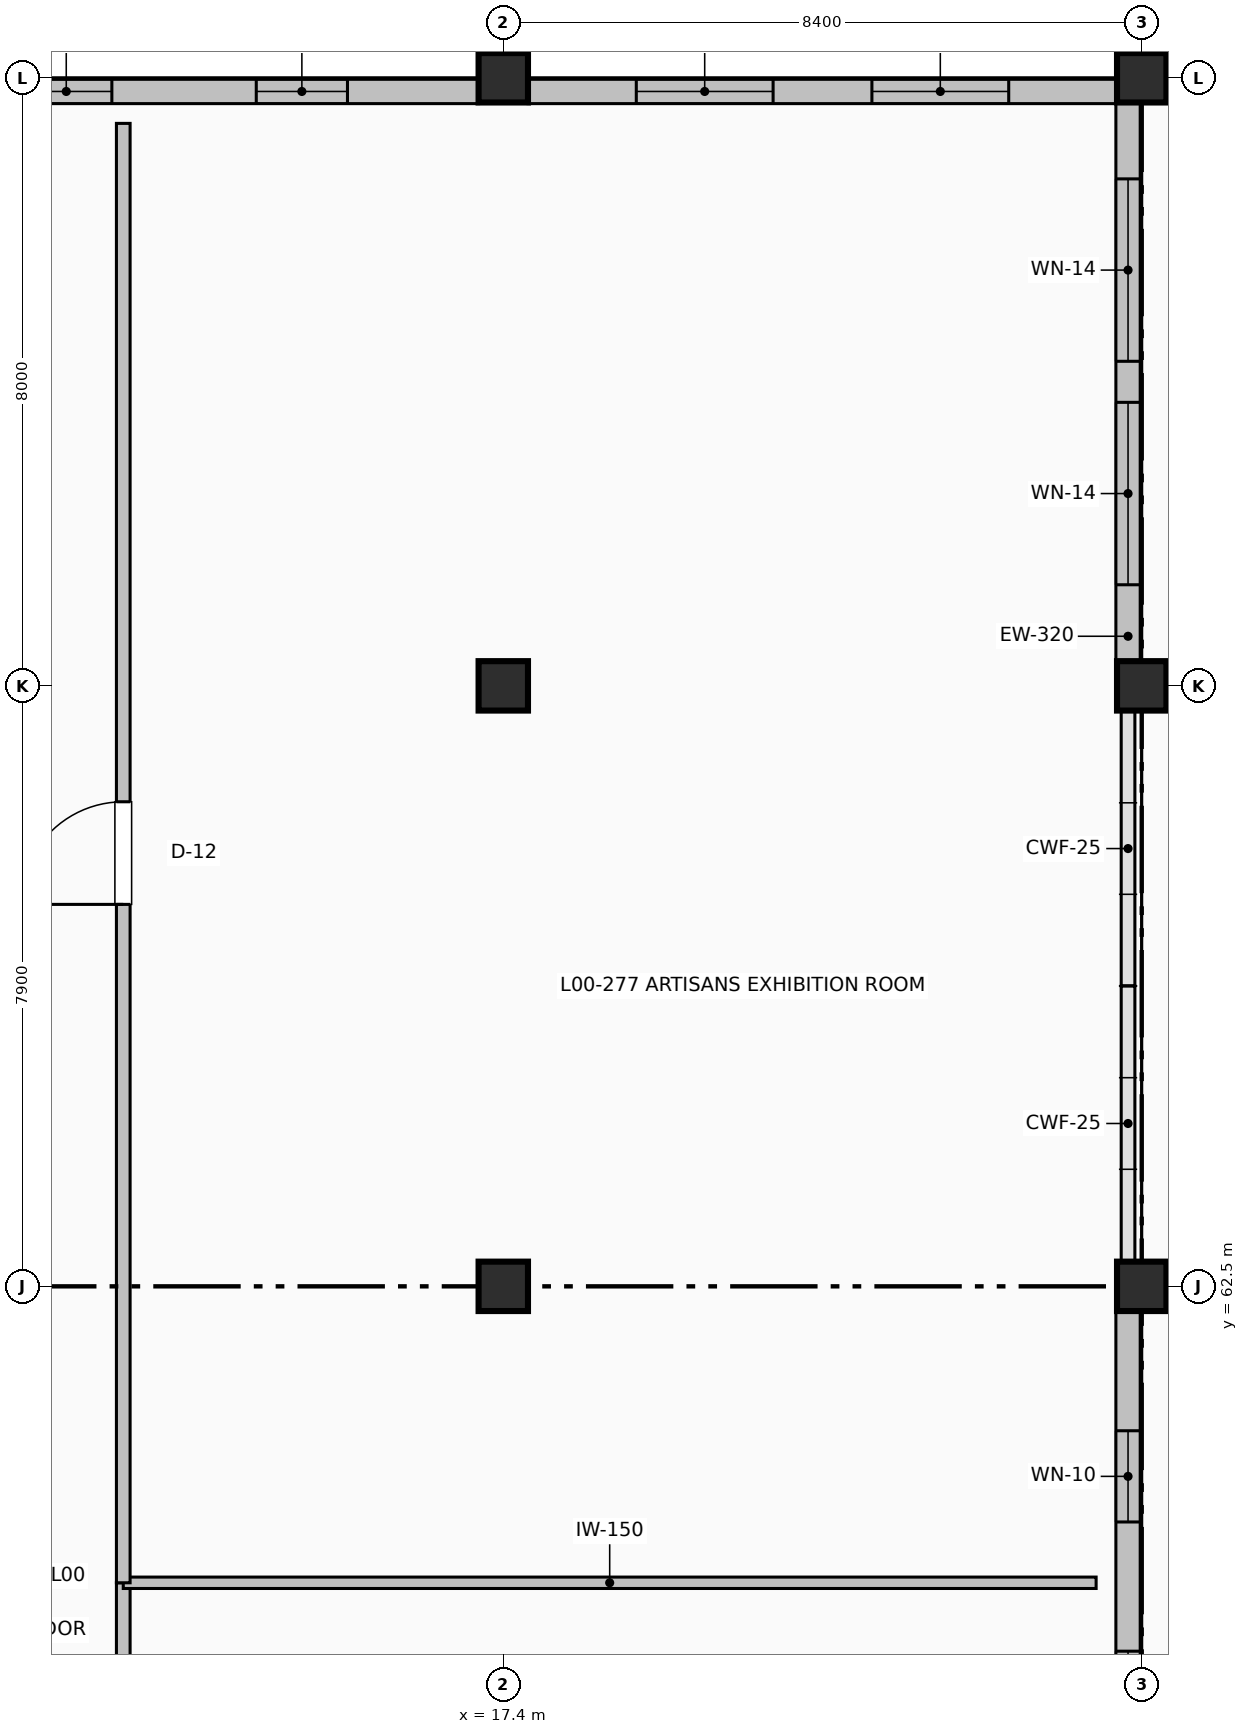
"""IFC4 building model, lengths in metres.
Left out: names, types, materials, properties, quantities, classifications, styles, units other than length and angle.
Written with IfcOpenShell. Run it as: python <this file> out.ifc"""

import sys

from ifc_helpers import new_model, si_unit, direction, frame, frame_2d, origin, origin_2d, place, context, subcontext, project, spatial, rectangle, extrude, element, fill, save


model = new_model("IFC4")
c1 = context("Model", 3, precision=1e-05, world=origin(), true_north=direction((0.0, 1.0)))
c2 = subcontext(c1, "Body", "Model", "MODEL_VIEW")
j1 = project(units=[si_unit("LENGTHUNIT", "METRE"), si_unit("PLANEANGLEUNIT", "RADIAN")], contexts=[c1])
p1 = place(None, origin())
s1 = spatial("IfcSite", under=j1, at=p1, CompositionType="ELEMENT")
p2 = place(p1, origin())
s2 = spatial("IfcBuilding", under=s1, at=p2, CompositionType="ELEMENT")
p3 = place(p2, origin())
s3 = spatial("IfcBuildingStorey", under=s2, at=p3, CompositionType="ELEMENT", Elevation=0.0)
for number, where, z_axis, x_axis in (
    (1, (17.4, 62.5, 0.0), (0.0, 0.0, 1.0), (1.0, 0.0, 0.0)),
    (2, (17.4, 70.4, 0.0), (0.0, 0.0, 1.0), (1.0, 0.0, 0.0)),
    (3, (17.4, 78.4, 0.0), (0.0, 0.0, 1.0), (1.0, 0.0, 0.0)),
    (4, (25.8, 62.5, 0.0), (0.0, 0.0, 1.0), (1.0, 0.0, 0.0)),
    (5, (25.8, 70.4, 0.0), (0.0, 0.0, 1.0), (1.0, 0.0, 0.0)),
    (6, (25.8, 78.4, 0.0), (0.0, 0.0, 1.0), (1.0, 0.0, 0.0)),
):
    element("IfcColumn", number, at=place(p3, frame(where, z_axis=z_axis, x_axis=x_axis)), inside=s3, PredefinedType="COLUMN", context=c2, shape_type="SweptSolid", body=[
        extrude(rectangle(XDim=0.65, YDim=0.65, at=origin_2d()), origin(), (0.0, 0.0, 1.0), 5.4),
    ])
p4 = place(p3, frame((9.325, 78.22, 0.0), z_axis=(0.0, 0.0, 1.0), x_axis=(1.0, 0.0, 0.0)))
e7 = element("IfcWall", 7, at=p4, inside=s3, PredefinedType="SOLIDWALL", context=c2, shape_type="SweptSolid", body=[
    extrude(rectangle(XDim=7.75, YDim=0.32, at=frame_2d((3.875, 0.0))), origin(), (0.0, 0.0, 1.0), 4.242),
])
p5 = place(p4, frame((1.725, 0.0, 0.95)))
e8 = element("IfcOpeningElement", 8, at=p5, cuts=e7, PredefinedType="OPENING", context=c2, shape_type="SweptSolid", body=[
    extrude(rectangle(XDim=1.2, YDim=1.9, at=frame_2d((0.6, 0.95))), frame((0.0, 0.17, 0.0), z_axis=(0.0, -1.0, 0.0), x_axis=(1.0, 0.0, 0.0)), (0.0, 0.0, 1.0), 0.34),
])
p6 = place(p4, frame((4.825, 0.0, 0.95)))
e9 = element("IfcOpeningElement", 9, at=p6, cuts=e7, PredefinedType="OPENING", context=c2, shape_type="SweptSolid", body=[
    extrude(rectangle(XDim=1.2, YDim=1.9, at=frame_2d((0.6, 0.95))), frame((0.0, 0.17, 0.0), z_axis=(0.0, -1.0, 0.0), x_axis=(1.0, 0.0, 0.0)), (0.0, 0.0, 1.0), 0.34),
])
p7 = place(p3, frame((17.725, 78.22, 0.0), z_axis=(0.0, 0.0, 1.0), x_axis=(1.0, 0.0, 0.0)))
e10 = element("IfcWall", 10, at=p7, inside=s3, PredefinedType="SOLIDWALL", context=c2, shape_type="SweptSolid", body=[
    extrude(rectangle(XDim=7.75, YDim=0.32, at=frame_2d((3.875, 0.0))), origin(), (0.0, 0.0, 1.0), 4.242),
])
p8 = place(p7, frame((1.425, 0.0, 0.95)))
e11 = element("IfcOpeningElement", 11, at=p8, cuts=e10, PredefinedType="OPENING", context=c2, shape_type="SweptSolid", body=[
    extrude(rectangle(XDim=1.8, YDim=1.9, at=frame_2d((0.9, 0.95))), frame((0.0, 0.17, 0.0), z_axis=(0.0, -1.0, 0.0), x_axis=(1.0, 0.0, 0.0)), (0.0, 0.0, 1.0), 0.34),
])
p9 = place(p7, frame((4.525, 0.0, 0.95)))
e12 = element("IfcOpeningElement", 12, at=p9, cuts=e10, PredefinedType="OPENING", context=c2, shape_type="SweptSolid", body=[
    extrude(rectangle(XDim=1.8, YDim=1.9, at=frame_2d((0.9, 0.95))), frame((0.0, 0.17, 0.0), z_axis=(0.0, -1.0, 0.0), x_axis=(1.0, 0.0, 0.0)), (0.0, 0.0, 1.0), 0.34),
])
p10 = place(p3, frame((25.62, 78.075, 0.0), z_axis=(0.0, 0.0, 1.0), x_axis=(0.0, -1.0, 0.0)))
e13 = element("IfcWall", 13, at=p10, inside=s3, PredefinedType="SOLIDWALL", context=c2, shape_type="SweptSolid", body=[
    extrude(rectangle(XDim=7.35, YDim=0.32, at=frame_2d((3.675, 0.0))), origin(), (0.0, 0.0, 1.0), 4.242),
])
p11 = place(p10, frame((1.005, 0.0, 0.95)))
e14 = element("IfcOpeningElement", 14, at=p11, cuts=e13, PredefinedType="OPENING", context=c2, shape_type="SweptSolid", body=[
    extrude(rectangle(XDim=2.4, YDim=1.9, at=frame_2d((1.2, 0.95))), frame((0.0, 0.17, 0.0), z_axis=(0.0, -1.0, 0.0), x_axis=(1.0, 0.0, 0.0)), (0.0, 0.0, 1.0), 0.34),
])
p12 = place(p10, frame((3.945, 0.0, 0.95)))
e15 = element("IfcOpeningElement", 15, at=p12, cuts=e13, PredefinedType="OPENING", context=c2, shape_type="SweptSolid", body=[
    extrude(rectangle(XDim=2.4, YDim=1.9, at=frame_2d((1.2, 0.95))), frame((0.0, 0.17, 0.0), z_axis=(0.0, -1.0, 0.0), x_axis=(1.0, 0.0, 0.0)), (0.0, 0.0, 1.0), 0.34),
])
p13 = place(p3, frame((25.62, 62.175, 0.0), z_axis=(0.0, 0.0, 1.0), x_axis=(0.0, -1.0, 0.0)))
e16 = element("IfcWall", 16, at=p13, inside=s3, PredefinedType="SOLIDWALL", context=c2, shape_type="SweptSolid", body=[
    extrude(rectangle(XDim=7.25, YDim=0.32, at=frame_2d((3.625, 0.0))), origin(), (0.0, 0.0, 1.0), 4.242),
])
p14 = place(p13, frame((1.575, 0.0, 0.95)))
e17 = element("IfcOpeningElement", 17, at=p14, cuts=e16, PredefinedType="OPENING", context=c2, shape_type="SweptSolid", body=[
    extrude(rectangle(XDim=1.2, YDim=1.9, at=frame_2d((0.6, 0.95))), frame((0.0, 0.17, 0.0), z_axis=(0.0, -1.0, 0.0), x_axis=(1.0, 0.0, 0.0)), (0.0, 0.0, 1.0), 0.34),
])
p15 = place(p13, frame((4.475, 0.0, 0.95)))
e18 = element("IfcOpeningElement", 18, at=p15, cuts=e16, PredefinedType="OPENING", context=c2, shape_type="SweptSolid", body=[
    extrude(rectangle(XDim=1.2, YDim=1.9, at=frame_2d((0.6, 0.95))), frame((0.0, 0.17, 0.0), z_axis=(0.0, -1.0, 0.0), x_axis=(1.0, 0.0, 0.0)), (0.0, 0.0, 1.0), 0.34),
])
p16 = place(p3, frame((12.4, 39.4, 0.0), z_axis=(0.0, 0.0, 1.0), x_axis=(0.0, 1.0, 0.0)))
e19 = element("IfcWall", 19, at=p16, inside=s3, PredefinedType="PARTITIONING", context=c2, shape_type="SweptSolid", body=[
    extrude(rectangle(XDim=19.2, YDim=0.18, at=frame_2d((9.6, 0.0))), origin(), (0.0, 0.0, 1.0), 5.092),
])
p17 = place(p16, frame((9.11, 0.0, 0.0)))
e20 = element("IfcOpeningElement", 20, at=p17, cuts=e19, PredefinedType="OPENING", context=c2, shape_type="SweptSolid", body=[
    extrude(rectangle(XDim=0.98, YDim=2.08, at=frame_2d((0.49, 1.04))), frame((0.0, 0.1, 0.0), z_axis=(0.0, -1.0, 0.0), x_axis=(1.0, 0.0, 0.0)), (0.0, 0.0, 1.0), 0.2),
])
p18 = place(p3, frame((12.4, 58.6, 0.0), z_axis=(0.0, 0.0, 1.0), x_axis=(1.0, 0.0, 0.0)))
e21 = element("IfcWall", 21, at=p18, inside=s3, PredefinedType="PARTITIONING", context=c2, shape_type="SweptSolid", body=[
    extrude(rectangle(XDim=12.8, YDim=0.15, at=frame_2d((6.4, 0.0))), origin(), (0.0, 0.0, 1.0), 4.492),
])
p19 = place(p3, frame((12.4, 58.6, 0.0), z_axis=(0.0, 0.0, 1.0), x_axis=(0.0, 1.0, 0.0)))
e22 = element("IfcWall", 22, at=p19, inside=s3, PredefinedType="PARTITIONING", context=c2, shape_type="SweptSolid", body=[
    extrude(rectangle(XDim=19.2, YDim=0.18, at=frame_2d((9.6, 0.0))), origin(), (0.0, 0.0, 1.0), 5.092),
])
p20 = place(p19, frame((8.925, 0.0, 0.0)))
e23 = element("IfcOpeningElement", 23, at=p20, cuts=e22, PredefinedType="OPENING", context=c2, shape_type="SweptSolid", body=[
    extrude(rectangle(XDim=1.35, YDim=2.16, at=frame_2d((0.675, 1.08))), frame((0.0, 0.1, 0.0), z_axis=(0.0, -1.0, 0.0), x_axis=(1.0, 0.0, 0.0)), (0.0, 0.0, 1.0), 0.2),
])
p21 = place(p5, origin())
e24 = element("IfcWindow", 24, at=p21, inside=s3, PartitioningType="SINGLE_PANEL", PredefinedType="WINDOW", context=c2, shape_type="SweptSolid", body=[
    extrude(rectangle(XDim=1.2, YDim=1.9, at=frame_2d((0.6, 0.95))), frame((0.0, 0.03, 0.0), z_axis=(0.0, -1.0, 0.0), x_axis=(1.0, 0.0, 0.0)), (0.0, 0.0, 1.0), 0.06),
])
fill(e8, e24)
p22 = place(p6, origin())
e25 = element("IfcWindow", 25, at=p22, inside=s3, PartitioningType="SINGLE_PANEL", PredefinedType="WINDOW", context=c2, shape_type="SweptSolid", body=[
    extrude(rectangle(XDim=1.2, YDim=1.9, at=frame_2d((0.6, 0.95))), frame((0.0, 0.03, 0.0), z_axis=(0.0, -1.0, 0.0), x_axis=(1.0, 0.0, 0.0)), (0.0, 0.0, 1.0), 0.06),
])
fill(e9, e25)
p23 = place(p8, origin())
e26 = element("IfcWindow", 26, at=p23, inside=s3, PartitioningType="SINGLE_PANEL", PredefinedType="WINDOW", context=c2, shape_type="SweptSolid", body=[
    extrude(rectangle(XDim=1.8, YDim=1.9, at=frame_2d((0.9, 0.95))), frame((0.0, 0.03, 0.0), z_axis=(0.0, -1.0, 0.0), x_axis=(1.0, 0.0, 0.0)), (0.0, 0.0, 1.0), 0.06),
])
fill(e11, e26)
p24 = place(p9, origin())
e27 = element("IfcWindow", 27, at=p24, inside=s3, PartitioningType="SINGLE_PANEL", PredefinedType="WINDOW", context=c2, shape_type="SweptSolid", body=[
    extrude(rectangle(XDim=1.8, YDim=1.9, at=frame_2d((0.9, 0.95))), frame((0.0, 0.03, 0.0), z_axis=(0.0, -1.0, 0.0), x_axis=(1.0, 0.0, 0.0)), (0.0, 0.0, 1.0), 0.06),
])
fill(e12, e27)
p25 = place(p11, origin())
e28 = element("IfcWindow", 28, at=p25, inside=s3, PartitioningType="SINGLE_PANEL", PredefinedType="WINDOW", context=c2, shape_type="SweptSolid", body=[
    extrude(rectangle(XDim=2.4, YDim=1.9, at=frame_2d((1.2, 0.95))), frame((0.0, 0.03, 0.0), z_axis=(0.0, -1.0, 0.0), x_axis=(1.0, 0.0, 0.0)), (0.0, 0.0, 1.0), 0.06),
])
fill(e14, e28)
p26 = place(p12, origin())
e29 = element("IfcWindow", 29, at=p26, inside=s3, PartitioningType="SINGLE_PANEL", PredefinedType="WINDOW", context=c2, shape_type="SweptSolid", body=[
    extrude(rectangle(XDim=2.4, YDim=1.9, at=frame_2d((1.2, 0.95))), frame((0.0, 0.03, 0.0), z_axis=(0.0, -1.0, 0.0), x_axis=(1.0, 0.0, 0.0)), (0.0, 0.0, 1.0), 0.06),
])
fill(e15, e29)
p27 = place(p14, origin())
e30 = element("IfcWindow", 30, at=p27, inside=s3, PartitioningType="SINGLE_PANEL", PredefinedType="WINDOW", context=c2, shape_type="SweptSolid", body=[
    extrude(rectangle(XDim=1.2, YDim=1.9, at=frame_2d((0.6, 0.95))), frame((0.0, 0.03, 0.0), z_axis=(0.0, -1.0, 0.0), x_axis=(1.0, 0.0, 0.0)), (0.0, 0.0, 1.0), 0.06),
])
fill(e17, e30)
p28 = place(p15, origin())
e31 = element("IfcWindow", 31, at=p28, inside=s3, PartitioningType="SINGLE_PANEL", PredefinedType="WINDOW", context=c2, shape_type="SweptSolid", body=[
    extrude(rectangle(XDim=1.2, YDim=1.9, at=frame_2d((0.6, 0.95))), frame((0.0, 0.03, 0.0), z_axis=(0.0, -1.0, 0.0), x_axis=(1.0, 0.0, 0.0)), (0.0, 0.0, 1.0), 0.06),
])
fill(e18, e31)
p29 = place(p20, origin())
e32 = element("IfcDoor", 32, at=p29, inside=s3, OperationType="SINGLE_SWING_LEFT", PredefinedType="DOOR", context=c2, shape_type="SweptSolid", body=[
    extrude(rectangle(XDim=1.35, YDim=2.16, at=frame_2d((0.675, 1.08))), frame((0.0, 0.025, 0.0), z_axis=(0.0, -1.0, 0.0), x_axis=(1.0, 0.0, 0.0)), (0.0, 0.0, 1.0), 0.05),
])
fill(e23, e32)
save(model, sys.argv[1])
